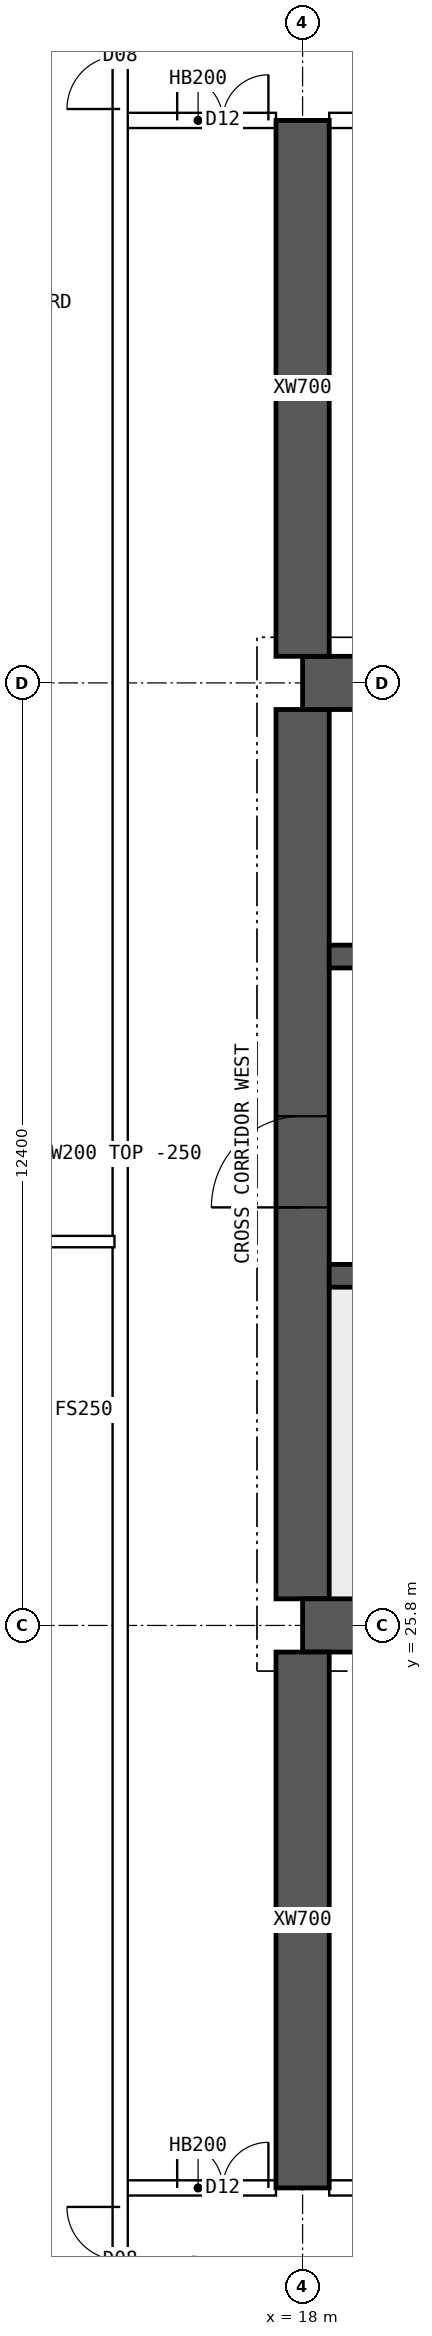
"""IFC4 building model, lengths in metres.
Left out: names, types, materials, properties, quantities, classifications, styles, units other than length and angle.
Written with IfcOpenShell. Run it as: python <this file> out.ifc"""

import sys

from ifc_helpers import new_model, si_unit, direction, frame, frame_2d, origin, place, context, subcontext, project, spatial, polyline, rectangle, outline, extrude, element, fill, save


model = new_model("IFC4")
c1 = context("Model", 3, precision=1e-05, world=origin(), true_north=direction((0.0, 1.0)))
c2 = subcontext(c1, "Body", "Model", "MODEL_VIEW")
j1 = project(units=[si_unit("LENGTHUNIT", "METRE"), si_unit("PLANEANGLEUNIT", "RADIAN")], contexts=[c1])
p1 = place(None, origin())
s1 = spatial("IfcSite", under=j1, at=p1, CompositionType="ELEMENT")
p2 = place(p1, origin())
s2 = spatial("IfcBuilding", under=s1, at=p2, CompositionType="ELEMENT")
p3 = place(p2, frame((0.0, 0.0, 235.3)))
s3 = spatial("IfcBuildingStorey", under=s2, at=p3, CompositionType="ELEMENT", Elevation=235.3)
for number, where, z_axis, x_axis in (
    (1, (18.0, 25.8, 0.0), (0.0, 0.0, 1.0), (1.0, 0.0, 0.0)),
    (2, (18.0, 38.2, 0.0), (0.0, 0.0, 1.0), (1.0, 0.0, 0.0)),
):
    element("IfcWall", number, at=place(p3, frame(where, z_axis=z_axis, x_axis=x_axis)), inside=s3, PredefinedType="SHEAR", context=c2, shape_type="SweptSolid", body=[
        extrude(rectangle(XDim=48.0, YDim=0.7, at=frame_2d((24.0, 0.0))), origin(), (0.0, 0.0, 1.0), 3.75),
    ])
p4 = place(p3, frame((18.0, 26.15, 0.0), z_axis=(0.0, 0.0, 1.0), x_axis=(0.0, 1.0, 0.0)))
e3 = element("IfcWall", 3, at=p4, inside=s3, PredefinedType="SHEAR", context=c2, shape_type="SweptSolid", body=[
    extrude(rectangle(XDim=11.7, YDim=0.7, at=frame_2d((5.85, 0.0))), origin(), (0.0, 0.0, 1.0), 3.75),
])
p5 = place(p4, frame((5.15, 0.0, 0.0)))
e4 = element("IfcOpeningElement", 4, at=p5, cuts=e3, PredefinedType="OPENING", context=c2, shape_type="SweptSolid", body=[
    extrude(rectangle(XDim=1.2, YDim=2.1, at=frame_2d((0.6, 1.05))), frame((0.0, 0.36, 0.0), z_axis=(0.0, -1.0, 0.0), x_axis=(1.0, 0.0, 0.0)), (0.0, 0.0, 1.0), 0.72),
])
p6 = place(p3, frame((18.35, 30.4, 0.0), z_axis=(0.0, 0.0, 1.0), x_axis=(1.0, 0.0, 0.0)))
e5 = element("IfcWall", 5, at=p6, inside=s3, PredefinedType="SHEAR", context=c2, shape_type="SweptSolid", body=[
    extrude(rectangle(XDim=47.3, YDim=0.3, at=frame_2d((23.65, 0.0))), origin(), (0.0, 0.0, 1.0), 3.75),
])
p7 = place(p6, frame((0.4, 0.0, 0.0)))
e6 = element("IfcOpeningElement", 6, at=p7, cuts=e5, PredefinedType="OPENING", context=c2, shape_type="SweptSolid", body=[
    extrude(rectangle(XDim=1.0, YDim=2.1, at=frame_2d((0.5, 1.05))), frame((0.0, 0.16, 0.0), z_axis=(0.0, -1.0, 0.0), x_axis=(1.0, 0.0, 0.0)), (0.0, 0.0, 1.0), 0.32),
])
p8 = place(p6, frame((45.9, 0.0, 0.0)))
e7 = element("IfcOpeningElement", 7, at=p8, cuts=e5, PredefinedType="OPENING", context=c2, shape_type="SweptSolid", body=[
    extrude(rectangle(XDim=1.0, YDim=2.1, at=frame_2d((0.5, 1.05))), frame((0.0, 0.16, 0.0), z_axis=(0.0, -1.0, 0.0), x_axis=(1.0, 0.0, 0.0)), (0.0, 0.0, 1.0), 0.32),
])
p9 = place(p6, frame((8.4, 0.0, 0.0)))
e8 = element("IfcOpeningElement", 8, at=p9, cuts=e5, PredefinedType="OPENING", context=c2, shape_type="SweptSolid", body=[
    extrude(rectangle(XDim=1.1, YDim=2.1, at=frame_2d((0.55, 1.05))), frame((0.0, 0.16, 0.0), z_axis=(0.0, -1.0, 0.0), x_axis=(1.0, 0.0, 0.0)), (0.0, 0.0, 1.0), 0.32),
])
p10 = place(p6, frame((11.0, 0.0, 0.0)))
e9 = element("IfcOpeningElement", 9, at=p10, cuts=e5, PredefinedType="OPENING", context=c2, shape_type="SweptSolid", body=[
    extrude(rectangle(XDim=1.1, YDim=2.1, at=frame_2d((0.55, 1.05))), frame((0.0, 0.16, 0.0), z_axis=(0.0, -1.0, 0.0), x_axis=(1.0, 0.0, 0.0)), (0.0, 0.0, 1.0), 0.32),
])
p11 = place(p6, frame((13.6, 0.0, 0.0)))
e10 = element("IfcOpeningElement", 10, at=p11, cuts=e5, PredefinedType="OPENING", context=c2, shape_type="SweptSolid", body=[
    extrude(rectangle(XDim=1.1, YDim=2.1, at=frame_2d((0.55, 1.05))), frame((0.0, 0.16, 0.0), z_axis=(0.0, -1.0, 0.0), x_axis=(1.0, 0.0, 0.0)), (0.0, 0.0, 1.0), 0.32),
])
p12 = place(p6, frame((16.2, 0.0, 0.0)))
e11 = element("IfcOpeningElement", 11, at=p12, cuts=e5, PredefinedType="OPENING", context=c2, shape_type="SweptSolid", body=[
    extrude(rectangle(XDim=1.1, YDim=2.1, at=frame_2d((0.55, 1.05))), frame((0.0, 0.16, 0.0), z_axis=(0.0, -1.0, 0.0), x_axis=(1.0, 0.0, 0.0)), (0.0, 0.0, 1.0), 0.32),
])
p13 = place(p6, frame((18.975, 0.0, 0.0)))
e12 = element("IfcOpeningElement", 12, at=p13, cuts=e5, PredefinedType="OPENING", context=c2, shape_type="SweptSolid", body=[
    extrude(rectangle(XDim=0.9, YDim=2.1, at=frame_2d((0.45, 1.05))), frame((0.0, 0.16, 0.0), z_axis=(0.0, -1.0, 0.0), x_axis=(1.0, 0.0, 0.0)), (0.0, 0.0, 1.0), 0.32),
])
p14 = place(p6, frame((24.475, 0.0, 0.0)))
e13 = element("IfcOpeningElement", 13, at=p14, cuts=e5, PredefinedType="OPENING", context=c2, shape_type="SweptSolid", body=[
    extrude(rectangle(XDim=0.9, YDim=2.1, at=frame_2d((0.45, 1.05))), frame((0.0, 0.16, 0.0), z_axis=(0.0, -1.0, 0.0), x_axis=(1.0, 0.0, 0.0)), (0.0, 0.0, 1.0), 0.32),
])
p15 = place(p6, frame((30.267, 0.0, 0.0)))
e14 = element("IfcOpeningElement", 14, at=p15, cuts=e5, PredefinedType="OPENING", context=c2, shape_type="SweptSolid", body=[
    extrude(rectangle(XDim=1.1, YDim=2.1, at=frame_2d((0.55, 1.05))), frame((0.0, 0.16, 0.0), z_axis=(0.0, -1.0, 0.0), x_axis=(1.0, 0.0, 0.0)), (0.0, 0.0, 1.0), 0.32),
])
p16 = place(p6, frame((33.8, 0.0, 0.0)))
e15 = element("IfcOpeningElement", 15, at=p16, cuts=e5, PredefinedType="OPENING", context=c2, shape_type="SweptSolid", body=[
    extrude(rectangle(XDim=1.1, YDim=2.1, at=frame_2d((0.55, 1.05))), frame((0.0, 0.16, 0.0), z_axis=(0.0, -1.0, 0.0), x_axis=(1.0, 0.0, 0.0)), (0.0, 0.0, 1.0), 0.32),
])
p17 = place(p6, frame((37.333, 0.0, 0.0)))
e16 = element("IfcOpeningElement", 16, at=p17, cuts=e5, PredefinedType="OPENING", context=c2, shape_type="SweptSolid", body=[
    extrude(rectangle(XDim=1.1, YDim=2.1, at=frame_2d((0.55, 1.05))), frame((0.0, 0.16, 0.0), z_axis=(0.0, -1.0, 0.0), x_axis=(1.0, 0.0, 0.0)), (0.0, 0.0, 1.0), 0.32),
])
p18 = place(p3, frame((18.35, 34.6, 0.0), z_axis=(0.0, 0.0, 1.0), x_axis=(1.0, 0.0, 0.0)))
e17 = element("IfcWall", 17, at=p18, inside=s3, PredefinedType="SHEAR", context=c2, shape_type="SweptSolid", body=[
    extrude(rectangle(XDim=47.3, YDim=0.3, at=frame_2d((23.65, 0.0))), origin(), (0.0, 0.0, 1.0), 3.75),
])
p19 = place(p18, frame((0.9, 0.0, 0.0)))
e18 = element("IfcOpeningElement", 18, at=p19, cuts=e17, PredefinedType="OPENING", context=c2, shape_type="SweptSolid", body=[
    extrude(rectangle(XDim=1.1, YDim=2.1, at=frame_2d((0.55, 1.05))), frame((0.0, 0.16, 0.0), z_axis=(0.0, -1.0, 0.0), x_axis=(1.0, 0.0, 0.0)), (0.0, 0.0, 1.0), 0.32),
])
p20 = place(p18, frame((45.3, 0.0, 0.0)))
e19 = element("IfcOpeningElement", 19, at=p20, cuts=e17, PredefinedType="OPENING", context=c2, shape_type="SweptSolid", body=[
    extrude(rectangle(XDim=1.1, YDim=2.1, at=frame_2d((0.55, 1.05))), frame((0.0, 0.16, 0.0), z_axis=(0.0, -1.0, 0.0), x_axis=(1.0, 0.0, 0.0)), (0.0, 0.0, 1.0), 0.32),
])
p21 = place(p18, frame((4.25, 0.0, 0.0)))
e20 = element("IfcOpeningElement", 20, at=p21, cuts=e17, PredefinedType="OPENING", context=c2, shape_type="SweptSolid", body=[
    extrude(rectangle(XDim=0.9, YDim=2.1, at=frame_2d((0.45, 1.05))), frame((0.0, 0.16, 0.0), z_axis=(0.0, -1.0, 0.0), x_axis=(1.0, 0.0, 0.0)), (0.0, 0.0, 1.0), 0.32),
])
p22 = place(p18, frame((42.15, 0.0, 0.0)))
e21 = element("IfcOpeningElement", 21, at=p22, cuts=e17, PredefinedType="OPENING", context=c2, shape_type="SweptSolid", body=[
    extrude(rectangle(XDim=0.9, YDim=2.1, at=frame_2d((0.45, 1.05))), frame((0.0, 0.16, 0.0), z_axis=(0.0, -1.0, 0.0), x_axis=(1.0, 0.0, 0.0)), (0.0, 0.0, 1.0), 0.32),
])
p23 = place(p18, frame((9.025, 0.0, 0.0)))
e22 = element("IfcOpeningElement", 22, at=p23, cuts=e17, PredefinedType="OPENING", context=c2, shape_type="SweptSolid", body=[
    extrude(rectangle(XDim=0.9, YDim=2.1, at=frame_2d((0.45, 1.05))), frame((0.0, 0.16, 0.0), z_axis=(0.0, -1.0, 0.0), x_axis=(1.0, 0.0, 0.0)), (0.0, 0.0, 1.0), 0.32),
])
p24 = place(p18, frame((12.999, 0.0, 0.0)))
e23 = element("IfcOpeningElement", 23, at=p24, cuts=e17, PredefinedType="OPENING", context=c2, shape_type="SweptSolid", body=[
    extrude(rectangle(XDim=0.9, YDim=2.1, at=frame_2d((0.45, 1.05))), frame((0.0, 0.16, 0.0), z_axis=(0.0, -1.0, 0.0), x_axis=(1.0, 0.0, 0.0)), (0.0, 0.0, 1.0), 0.32),
])
p25 = place(p18, frame((16.646, 0.0, 0.0)))
e24 = element("IfcOpeningElement", 24, at=p25, cuts=e17, PredefinedType="OPENING", context=c2, shape_type="SweptSolid", body=[
    extrude(rectangle(XDim=0.9, YDim=2.1, at=frame_2d((0.45, 1.05))), frame((0.0, 0.16, 0.0), z_axis=(0.0, -1.0, 0.0), x_axis=(1.0, 0.0, 0.0)), (0.0, 0.0, 1.0), 0.32),
])
p26 = place(p18, frame((20.405, 0.0, 0.0)))
e25 = element("IfcOpeningElement", 25, at=p26, cuts=e17, PredefinedType="OPENING", context=c2, shape_type="SweptSolid", body=[
    extrude(rectangle(XDim=0.9, YDim=2.1, at=frame_2d((0.45, 1.05))), frame((0.0, 0.16, 0.0), z_axis=(0.0, -1.0, 0.0), x_axis=(1.0, 0.0, 0.0)), (0.0, 0.0, 1.0), 0.32),
])
p27 = place(p18, frame((24.811, 0.0, 0.0)))
e26 = element("IfcOpeningElement", 26, at=p27, cuts=e17, PredefinedType="OPENING", context=c2, shape_type="SweptSolid", body=[
    extrude(rectangle(XDim=0.9, YDim=2.1, at=frame_2d((0.45, 1.05))), frame((0.0, 0.16, 0.0), z_axis=(0.0, -1.0, 0.0), x_axis=(1.0, 0.0, 0.0)), (0.0, 0.0, 1.0), 0.32),
])
p28 = place(p18, frame((27.608, 0.0, 0.0)))
e27 = element("IfcOpeningElement", 27, at=p28, cuts=e17, PredefinedType="OPENING", context=c2, shape_type="SweptSolid", body=[
    extrude(rectangle(XDim=0.9, YDim=2.1, at=frame_2d((0.45, 1.05))), frame((0.0, 0.16, 0.0), z_axis=(0.0, -1.0, 0.0), x_axis=(1.0, 0.0, 0.0)), (0.0, 0.0, 1.0), 0.32),
])
p29 = place(p18, frame((30.791, 0.0, 0.0)))
e28 = element("IfcOpeningElement", 28, at=p29, cuts=e17, PredefinedType="OPENING", context=c2, shape_type="SweptSolid", body=[
    extrude(rectangle(XDim=0.9, YDim=2.1, at=frame_2d((0.45, 1.05))), frame((0.0, 0.16, 0.0), z_axis=(0.0, -1.0, 0.0), x_axis=(1.0, 0.0, 0.0)), (0.0, 0.0, 1.0), 0.32),
])
p30 = place(p18, frame((34.742, 0.0, 0.0)))
e29 = element("IfcOpeningElement", 29, at=p30, cuts=e17, PredefinedType="OPENING", context=c2, shape_type="SweptSolid", body=[
    extrude(rectangle(XDim=0.9, YDim=2.1, at=frame_2d((0.45, 1.05))), frame((0.0, 0.16, 0.0), z_axis=(0.0, -1.0, 0.0), x_axis=(1.0, 0.0, 0.0)), (0.0, 0.0, 1.0), 0.32),
])
p31 = place(p18, frame((37.68, 0.0, 0.0)))
e30 = element("IfcOpeningElement", 30, at=p31, cuts=e17, PredefinedType="OPENING", context=c2, shape_type="SweptSolid", body=[
    extrude(rectangle(XDim=0.9, YDim=2.1, at=frame_2d((0.45, 1.05))), frame((0.0, 0.16, 0.0), z_axis=(0.0, -1.0, 0.0), x_axis=(1.0, 0.0, 0.0)), (0.0, 0.0, 1.0), 0.32),
])
for number, where, z_axis, x_axis in (
    (31, (18.0, 18.4, 0.0), (0.0, 0.0, 1.0), (0.0, 1.0, 0.0)),
    (32, (18.0, 38.55, 0.0), (0.0, 0.0, 1.0), (0.0, 1.0, 0.0)),
):
    element("IfcWall", number, at=place(p3, frame(where, z_axis=z_axis, x_axis=x_axis)), inside=s3, PredefinedType="SHEAR", context=c2, shape_type="SweptSolid", body=[
        extrude(rectangle(XDim=7.05, YDim=0.7, at=frame_2d((3.525, 0.0))), origin(), (0.0, 0.0, 1.0), 3.75),
    ])
p32 = place(p3, frame((15.6, 18.4, 0.0), z_axis=(0.0, 0.0, 1.0), x_axis=(1.0, 0.0, 0.0)))
e33 = element("IfcWall", 33, at=p32, inside=s3, PredefinedType="SOLIDWALL", context=c2, shape_type="SweptSolid", body=[
    extrude(rectangle(XDim=2.05, YDim=0.2, at=frame_2d((1.025, 0.0))), origin(), (0.0, 0.0, 1.0), 3.5),
])
p33 = place(p32, frame((0.75, 0.0, 0.0)))
e34 = element("IfcOpeningElement", 34, at=p33, cuts=e33, PredefinedType="OPENING", context=c2, shape_type="SweptSolid", body=[
    extrude(rectangle(XDim=1.2, YDim=2.1, at=frame_2d((0.6, 1.05))), frame((0.0, 0.11, 0.0), z_axis=(0.0, -1.0, 0.0), x_axis=(1.0, 0.0, 0.0)), (0.0, 0.0, 1.0), 0.22),
])
p34 = place(p3, frame((18.35, 18.4, 0.0), z_axis=(0.0, 0.0, 1.0), x_axis=(1.0, 0.0, 0.0)))
e35 = element("IfcWall", 35, at=p34, inside=s3, PredefinedType="SOLIDWALL", context=c2, shape_type="SweptSolid", body=[
    extrude(rectangle(XDim=5.3, YDim=0.2, at=frame_2d((2.65, 0.0))), origin(), (0.0, 0.0, 1.0), 3.5),
])
p35 = place(p34, frame((0.35, 0.0, 0.0)))
e36 = element("IfcOpeningElement", 36, at=p35, cuts=e35, PredefinedType="OPENING", context=c2, shape_type="SweptSolid", body=[
    extrude(rectangle(XDim=0.9, YDim=2.1, at=frame_2d((0.45, 1.05))), frame((0.0, 0.11, 0.0), z_axis=(0.0, -1.0, 0.0), x_axis=(1.0, 0.0, 0.0)), (0.0, 0.0, 1.0), 0.22),
])
p36 = place(p34, frame((2.725, 0.0, 0.0)))
e37 = element("IfcOpeningElement", 37, at=p36, cuts=e35, PredefinedType="OPENING", context=c2, shape_type="SweptSolid", body=[
    extrude(rectangle(XDim=0.9, YDim=2.1, at=frame_2d((0.45, 1.05))), frame((0.0, 0.11, 0.0), z_axis=(0.0, -1.0, 0.0), x_axis=(1.0, 0.0, 0.0)), (0.0, 0.0, 1.0), 0.22),
])
p37 = place(p3, frame((15.6, 45.6, 0.0), z_axis=(0.0, 0.0, 1.0), x_axis=(1.0, 0.0, 0.0)))
e38 = element("IfcWall", 38, at=p37, inside=s3, PredefinedType="SOLIDWALL", context=c2, shape_type="SweptSolid", body=[
    extrude(rectangle(XDim=2.05, YDim=0.2, at=frame_2d((1.025, 0.0))), origin(), (0.0, 0.0, 1.0), 3.5),
])
p38 = place(p37, frame((0.75, 0.0, 0.0)))
e39 = element("IfcOpeningElement", 39, at=p38, cuts=e38, PredefinedType="OPENING", context=c2, shape_type="SweptSolid", body=[
    extrude(rectangle(XDim=1.2, YDim=2.1, at=frame_2d((0.6, 1.05))), frame((0.0, 0.11, 0.0), z_axis=(0.0, -1.0, 0.0), x_axis=(1.0, 0.0, 0.0)), (0.0, 0.0, 1.0), 0.22),
])
p39 = place(p3, frame((18.35, 45.6, 0.0), z_axis=(0.0, 0.0, 1.0), x_axis=(1.0, 0.0, 0.0)))
e40 = element("IfcWall", 40, at=p39, inside=s3, PredefinedType="SOLIDWALL", context=c2, shape_type="SweptSolid", body=[
    extrude(rectangle(XDim=5.3, YDim=0.2, at=frame_2d((2.65, 0.0))), origin(), (0.0, 0.0, 1.0), 3.5),
])
p40 = place(p39, frame((0.8, 0.0, 0.0)))
e41 = element("IfcOpeningElement", 41, at=p40, cuts=e40, PredefinedType="OPENING", context=c2, shape_type="SweptSolid", body=[
    extrude(rectangle(XDim=1.0, YDim=2.1, at=frame_2d((0.5, 1.05))), frame((0.0, 0.11, 0.0), z_axis=(0.0, -1.0, 0.0), x_axis=(1.0, 0.0, 0.0)), (0.0, 0.0, 1.0), 0.22),
])
p41 = place(p3, frame((8.705, 30.85, 0.0), z_axis=(0.0, 0.0, 1.0), x_axis=(1.0, 0.0, 0.0)))
e42 = element("IfcWall", 42, at=p41, inside=s3, PredefinedType="PARTITIONING", context=c2, shape_type="SweptSolid", body=[
    extrude(outline(polyline([(0.0, 0.0), (6.82, 0.0), (6.82, 3.5), (3.597, 3.5), (3.595, 3.05), (2.997, 3.05), (2.995, 3.5), (0.0, 3.5), (0.0, 0.0)])), frame((0.0, 0.075, 0.0), z_axis=(0.0, -1.0, 0.0), x_axis=(1.0, 0.0, 0.0)), (0.0, 0.0, 1.0), 0.15),
])
p42 = place(p3, frame((15.6, 11.646, 0.0), z_axis=(0.0, 0.0, 1.0), x_axis=(0.0, 1.0, 0.0)))
e43 = element("IfcWall", 43, at=p42, inside=s3, PredefinedType="SOLIDWALL", context=c2, shape_type="SweptSolid", body=[
    extrude(rectangle(XDim=40.708, YDim=0.2, at=frame_2d((20.354, 0.0))), origin(), (0.0, 0.0, 1.0), 3.5),
])
p43 = place(p42, frame((5.104, 0.0, 0.0)))
e44 = element("IfcOpeningElement", 44, at=p43, cuts=e43, PredefinedType="OPENING", context=c2, shape_type="SweptSolid", body=[
    extrude(rectangle(XDim=1.4, YDim=2.1, at=frame_2d((0.7, 1.05))), frame((0.0, 0.11, 0.0), z_axis=(0.0, -1.0, 0.0), x_axis=(1.0, 0.0, 0.0)), (0.0, 0.0, 1.0), 0.22),
])
p44 = place(p42, frame((34.104, 0.0, 0.0)))
e45 = element("IfcOpeningElement", 45, at=p44, cuts=e43, PredefinedType="OPENING", context=c2, shape_type="SweptSolid", body=[
    extrude(rectangle(XDim=1.4, YDim=2.1, at=frame_2d((0.7, 1.05))), frame((0.0, 0.11, 0.0), z_axis=(0.0, -1.0, 0.0), x_axis=(1.0, 0.0, 0.0)), (0.0, 0.0, 1.0), 0.22),
])
p45 = place(p5, origin())
e46 = element("IfcDoor", 46, at=p45, inside=s3, OperationType="SINGLE_SWING_LEFT", PredefinedType="DOOR", context=c2, shape_type="SweptSolid", body=[
    extrude(rectangle(XDim=1.2, YDim=2.1, at=frame_2d((0.6, 1.05))), frame((0.0, 0.025, 0.0), z_axis=(0.0, -1.0, 0.0), x_axis=(1.0, 0.0, 0.0)), (0.0, 0.0, 1.0), 0.05),
])
fill(e4, e46)
p46 = place(p33, origin())
e47 = element("IfcDoor", 47, at=p46, inside=s3, OperationType="DOUBLE_DOOR_SINGLE_SWING", PredefinedType="DOOR", context=c2, shape_type="SweptSolid", body=[
    extrude(rectangle(XDim=1.2, YDim=2.1, at=frame_2d((0.6, 1.05))), frame((0.0, 0.025, 0.0), z_axis=(0.0, -1.0, 0.0), x_axis=(1.0, 0.0, 0.0)), (0.0, 0.0, 1.0), 0.05),
])
fill(e34, e47)
p47 = place(p38, origin())
e48 = element("IfcDoor", 48, at=p47, inside=s3, OperationType="DOUBLE_DOOR_SINGLE_SWING", PredefinedType="DOOR", context=c2, shape_type="SweptSolid", body=[
    extrude(rectangle(XDim=1.2, YDim=2.1, at=frame_2d((0.6, 1.05))), frame((0.0, 0.025, 0.0), z_axis=(0.0, -1.0, 0.0), x_axis=(1.0, 0.0, 0.0)), (0.0, 0.0, 1.0), 0.05),
])
fill(e39, e48)
p48 = place(p43, origin())
e49 = element("IfcDoor", 49, at=p48, inside=s3, OperationType="DOUBLE_DOOR_SINGLE_SWING", PredefinedType="DOOR", context=c2, shape_type="SweptSolid", body=[
    extrude(rectangle(XDim=1.4, YDim=2.1, at=frame_2d((0.7, 1.05))), frame((0.0, 0.025, 0.0), z_axis=(0.0, -1.0, 0.0), x_axis=(1.0, 0.0, 0.0)), (0.0, 0.0, 1.0), 0.05),
])
fill(e44, e49)
p49 = place(p44, origin())
e50 = element("IfcDoor", 50, at=p49, inside=s3, OperationType="DOUBLE_DOOR_SINGLE_SWING", PredefinedType="DOOR", context=c2, shape_type="SweptSolid", body=[
    extrude(rectangle(XDim=1.4, YDim=2.1, at=frame_2d((0.7, 1.05))), frame((0.0, 0.025, 0.0), z_axis=(0.0, -1.0, 0.0), x_axis=(1.0, 0.0, 0.0)), (0.0, 0.0, 1.0), 0.05),
])
fill(e45, e50)
save(model, sys.argv[1])
